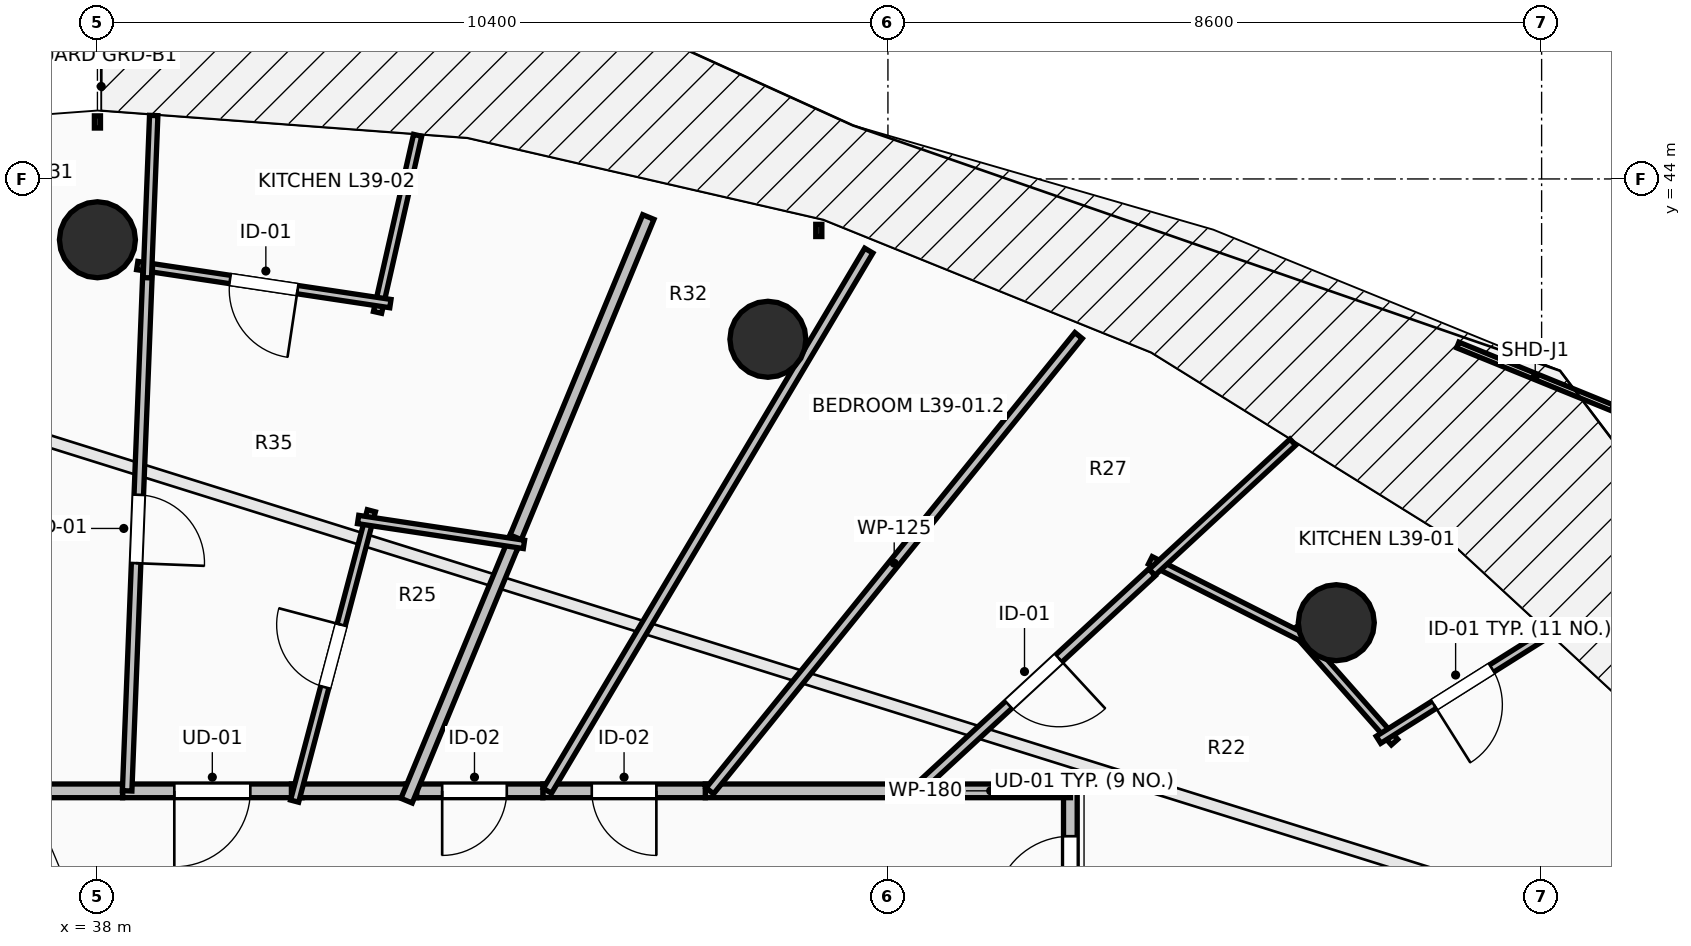
"""IFC4 building model, lengths in metres.
Left out: names, types, materials, properties, quantities, classifications, styles, units other than length and angle.
Written with IfcOpenShell. Run it as: python <this file> out.ifc"""

import sys

from ifc_helpers import new_model, si_unit, direction, frame, frame_2d, origin, origin_2d, place, context, subcontext, project, spatial, rectangle, circle, extrude, element, fill, save


model = new_model("IFC4")
c1 = context("Model", 3, precision=1e-05, world=origin(), true_north=direction((0.0, 1.0)))
c2 = subcontext(c1, "Body", "Model", "MODEL_VIEW")
j1 = project(units=[si_unit("LENGTHUNIT", "METRE"), si_unit("PLANEANGLEUNIT", "RADIAN")], contexts=[c1])
p1 = place(None, origin())
s1 = spatial("IfcSite", under=j1, at=p1, CompositionType="ELEMENT")
p2 = place(p1, origin())
s2 = spatial("IfcBuilding", under=s1, at=p2, CompositionType="ELEMENT")
p3 = place(p2, frame((0.0, 0.0, 146.6)))
s3 = spatial("IfcBuildingStorey", under=s2, at=p3, CompositionType="ELEMENT", Elevation=146.6)
for number, where, z_axis, x_axis in (
    (1, (54.299, 38.162, 0.0), (0.0, 0.0, 1.0), (0.707, 0.707, 0.0)),
    (2, (46.821, 41.891, 0.0), (0.0, 0.0, 1.0), (0.383, 0.924, 0.0)),
    (3, (38.0, 43.2, 0.0), (0.0, 0.0, 1.0), (0.0, 1.0, 0.0)),
):
    element("IfcColumn", number, at=place(p3, frame(where, z_axis=z_axis, x_axis=x_axis)), inside=s3, PredefinedType="COLUMN", context=c2, shape_type="SweptSolid", body=[
        extrude(circle(Radius=0.5, at=origin_2d()), origin(), (0.0, 0.0, 1.0), 3.5),
    ])
p4 = place(p3, frame((50.8, 33.756, 0.0), z_axis=(0.0, 0.0, 1.0), x_axis=(0.0, 1.0, 0.0)))
e4 = element("IfcWall", 4, at=p4, inside=s3, PredefinedType="PARTITIONING", context=c2, shape_type="SweptSolid", body=[
    extrude(rectangle(XDim=2.194, YDim=0.18, at=frame_2d((1.097, 0.0))), origin(), (0.0, 0.0, 1.0), 2.432),
])
p5 = place(p4, frame((0.597, 0.0, 0.0)))
e5 = element("IfcOpeningElement", 5, at=p5, cuts=e4, PredefinedType="OPENING", context=c2, shape_type="SweptSolid", body=[
    extrude(rectangle(XDim=1.0, YDim=2.15, at=frame_2d((0.5, 1.075))), frame((0.0, 0.105, 0.0), z_axis=(0.0, -1.0, 0.0), x_axis=(1.0, 0.0, 0.0)), (0.0, 0.0, 1.0), 0.21),
])
p6 = place(p3, frame((50.8, 35.95, 0.0), z_axis=(0.0, 0.0, 1.0), x_axis=(-1.0, 0.0, 0.0)))
e6 = element("IfcWall", 6, at=p6, inside=s3, PredefinedType="PARTITIONING", context=c2, shape_type="SweptSolid", body=[
    extrude(rectangle(XDim=2.096, YDim=0.18, at=frame_2d((1.048, 0.0))), origin(), (0.0, 0.0, 1.0), 2.972),
])
p7 = place(p3, frame((48.704, 35.95, 0.0), z_axis=(0.0, 0.0, 1.0), x_axis=(-1.0, 0.0, 0.0)))
e7 = element("IfcWall", 7, at=p7, inside=s3, PredefinedType="PARTITIONING", context=c2, shape_type="SweptSolid", body=[
    extrude(rectangle(XDim=2.707, YDim=0.18, at=frame_2d((1.354, 0.0))), origin(), (0.0, 0.0, 1.0), 2.432),
])
p8 = place(p3, frame((45.997, 35.95, 0.0), z_axis=(0.0, 0.0, 1.0), x_axis=(-1.0, 0.0, 0.0)))
e8 = element("IfcWall", 8, at=p8, inside=s3, PredefinedType="PARTITIONING", context=c2, shape_type="SweptSolid", body=[
    extrude(rectangle(XDim=2.137, YDim=0.18, at=frame_2d((1.068, 0.0))), origin(), (0.0, 0.0, 1.0), 2.972),
])
p9 = place(p8, frame((0.644, 0.0, 0.0)))
e9 = element("IfcOpeningElement", 9, at=p9, cuts=e8, PredefinedType="OPENING", context=c2, shape_type="SweptSolid", body=[
    extrude(rectangle(XDim=0.85, YDim=2.1, at=frame_2d((0.425, 1.05))), frame((0.0, 0.105, 0.0), z_axis=(0.0, -1.0, 0.0), x_axis=(1.0, 0.0, 0.0)), (0.0, 0.0, 1.0), 0.21),
])
p10 = place(p3, frame((43.86, 35.95, 0.0), z_axis=(0.0, 0.0, 1.0), x_axis=(-1.0, 0.0, 0.0)))
e10 = element("IfcWall", 10, at=p10, inside=s3, PredefinedType="PARTITIONING", context=c2, shape_type="SweptSolid", body=[
    extrude(rectangle(XDim=1.799, YDim=0.18, at=frame_2d((0.899, 0.0))), origin(), (0.0, 0.0, 1.0), 3.24),
])
p11 = place(p10, frame((0.475, 0.0, 0.0)))
e11 = element("IfcOpeningElement", 11, at=p11, cuts=e10, PredefinedType="OPENING", context=c2, shape_type="SweptSolid", body=[
    extrude(rectangle(XDim=0.85, YDim=2.1, at=frame_2d((0.425, 1.05))), frame((0.0, 0.105, 0.0), z_axis=(0.0, -1.0, 0.0), x_axis=(1.0, 0.0, 0.0)), (0.0, 0.0, 1.0), 0.21),
])
p12 = place(p3, frame((40.692, 35.95, 0.0), z_axis=(0.0, 0.0, 1.0), x_axis=(-1.0, 0.0, 0.0)))
e12 = element("IfcWall", 12, at=p12, inside=s3, PredefinedType="PARTITIONING", context=c2, shape_type="SweptSolid", body=[
    extrude(rectangle(XDim=2.361, YDim=0.18, at=frame_2d((1.18, 0.0))), origin(), (0.0, 0.0, 1.0), 3.24),
])
p13 = place(p12, frame((0.68, 0.0, 0.0)))
e13 = element("IfcOpeningElement", 13, at=p13, cuts=e12, PredefinedType="OPENING", context=c2, shape_type="SweptSolid", body=[
    extrude(rectangle(XDim=1.0, YDim=2.15, at=frame_2d((0.5, 1.075))), frame((0.0, 0.105, 0.0), z_axis=(0.0, -1.0, 0.0), x_axis=(1.0, 0.0, 0.0)), (0.0, 0.0, 1.0), 0.21),
])
p14 = place(p3, frame((42.201, 35.95, 0.0), z_axis=(0.0, 0.0, 1.0), x_axis=(-1.0, 0.0, 0.0)))
e14 = element("IfcWall", 14, at=p14, inside=s3, PredefinedType="PARTITIONING", context=c2, shape_type="SweptSolid", body=[
    extrude(rectangle(XDim=1.649, YDim=0.18, at=frame_2d((0.824, 0.0))), origin(), (0.0, 0.0, 1.0), 3.24),
])
p15 = place(p3, frame((38.331, 35.95, 0.0), z_axis=(0.0, 0.0, 1.0), x_axis=(-1.0, 0.0, 0.0)))
e15 = element("IfcWall", 15, at=p15, inside=s3, PredefinedType="PARTITIONING", context=c2, shape_type="SweptSolid", body=[
    extrude(rectangle(XDim=1.437, YDim=0.18, at=frame_2d((0.719, 0.0))), origin(), (0.0, 0.0, 1.0), 3.24),
])
p16 = place(p3, frame((55.065, 36.591, 0.0), z_axis=(0.0, 0.0, 1.0), x_axis=(-0.66216897397, 0.749354555542, 0.0)))
e16 = element("IfcWall", 16, at=p16, inside=s3, PredefinedType="PARTITIONING", context=c2, shape_type="SweptSolid", body=[
    extrude(rectangle(XDim=1.991, YDim=0.11, at=frame_2d((0.996, 0.0))), origin(), (0.0, 0.0, 1.0), 2.432),
])
p17 = place(p3, frame((53.964, 37.915, 0.0), z_axis=(0.0, 0.0, 1.0), x_axis=(-0.89250004606, 0.451047301049, 0.0)))
e17 = element("IfcWall", 17, at=p17, inside=s3, PredefinedType="PARTITIONING", context=c2, shape_type="SweptSolid", body=[
    extrude(rectangle(XDim=2.366, YDim=0.11, at=frame_2d((1.183, 0.0))), origin(), (0.0, 0.0, 1.0), 2.432),
])
p18 = place(p3, frame((51.874, 38.824, 0.0), z_axis=(0.0, 0.0, 1.0), x_axis=(0.734191073284, 0.678942904749, 0.0)))
e18 = element("IfcWall", 18, at=p18, inside=s3, PredefinedType="PARTITIONING", context=c2, shape_type="SweptSolid", body=[
    extrude(rectangle(XDim=2.523, YDim=0.11, at=frame_2d((1.262, 0.0))), origin(), (0.0, 0.0, 1.0), 2.728),
])
p19 = place(p3, frame((57.075, 38.021, 0.0), z_axis=(0.0, 0.0, 1.0), x_axis=(-0.846034075758, -0.533128823697, 0.0)))
e19 = element("IfcWall", 19, at=p19, inside=s3, PredefinedType="PARTITIONING", context=c2, shape_type="SweptSolid", body=[
    extrude(rectangle(XDim=2.626, YDim=0.11, at=frame_2d((1.313, 0.0))), origin(), (0.0, 0.0, 1.0), 2.728),
])
p20 = place(p19, frame((0.863, 0.0, 0.0)))
e20 = element("IfcOpeningElement", 20, at=p20, cuts=e19, PredefinedType="OPENING", context=c2, shape_type="SweptSolid", body=[
    extrude(rectangle(XDim=0.9, YDim=2.1, at=frame_2d((0.45, 1.05))), frame((0.0, 0.07, 0.0), z_axis=(0.0, -1.0, 0.0), x_axis=(1.0, 0.0, 0.0)), (0.0, 0.0, 1.0), 0.14),
])
p21 = place(p3, frame((51.874, 38.824, 0.0), z_axis=(0.0, 0.0, 1.0), x_axis=(-0.734347971597, -0.678773199685, 0.0)))
e21 = element("IfcWall", 21, at=p21, inside=s3, PredefinedType="PARTITIONING", context=c2, shape_type="SweptSolid", body=[
    extrude(rectangle(XDim=4.235, YDim=0.125, at=frame_2d((2.117, 0.0))), origin(), (0.0, 0.0, 1.0), 2.922),
])
p22 = place(p21, frame((1.667, 0.0, 0.0)))
e22 = element("IfcOpeningElement", 22, at=p22, cuts=e21, PredefinedType="OPENING", context=c2, shape_type="SweptSolid", body=[
    extrude(rectangle(XDim=0.9, YDim=2.1, at=frame_2d((0.45, 1.05))), frame((0.0, 0.077, 0.0), z_axis=(0.0, -1.0, 0.0), x_axis=(1.0, 0.0, 0.0)), (0.0, 0.0, 1.0), 0.155),
])
p23 = place(p3, frame((54.156, 32.692, 0.0), z_axis=(0.0, 0.0, 1.0), x_axis=(0.923849528339, 0.382755860814, 0.0)))
e23 = element("IfcWall", 23, at=p23, inside=s3, PredefinedType="PARTITIONING", context=c2, shape_type="SweptSolid", body=[
    extrude(rectangle(XDim=5.941, YDim=0.16, at=frame_2d((2.97, 0.0))), origin(), (0.0, 0.0, 1.0), 2.432),
])
p24 = place(p3, frame((50.908, 41.94, 0.0), z_axis=(0.0, 0.0, 1.0), x_axis=(-0.62935766896, -0.77711577292, 0.0)))
e24 = element("IfcWall", 24, at=p24, inside=s3, PredefinedType="PARTITIONING", context=c2, shape_type="SweptSolid", body=[
    extrude(rectangle(XDim=7.708, YDim=0.125, at=frame_2d((3.854, 0.0))), origin(), (0.0, 0.0, 1.0), 2.432),
])
p25 = place(p3, frame((48.148, 43.057, 0.0), z_axis=(0.0, 0.0, 1.0), x_axis=(-0.511279346901, -0.859414585304, 0.0)))
e25 = element("IfcWall", 25, at=p25, inside=s3, PredefinedType="PARTITIONING", context=c2, shape_type="SweptSolid", body=[
    extrude(rectangle(XDim=8.27, YDim=0.125, at=frame_2d((4.135, 0.0))), origin(), (0.0, 0.0, 1.0), 2.432),
])
p26 = place(p3, frame((45.248, 43.499, 0.0), z_axis=(0.0, 0.0, 1.0), x_axis=(-0.382708032219, -0.923869342535, 0.0)))
e26 = element("IfcWall", 26, at=p26, inside=s3, PredefinedType="PARTITIONING", context=c2, shape_type="SweptSolid", body=[
    extrude(rectangle(XDim=4.701, YDim=0.16, at=frame_2d((2.351, 0.0))), origin(), (0.0, 0.0, 1.0), 2.728),
])
p27 = place(p3, frame((43.503, 39.285, 0.0), z_axis=(0.0, 0.0, 1.0), x_axis=(-0.382733183699, -0.923858923265, 0.0)))
e27 = element("IfcWall", 27, at=p27, inside=s3, PredefinedType="PARTITIONING", context=c2, shape_type="SweptSolid", body=[
    extrude(rectangle(XDim=3.75, YDim=0.16, at=frame_2d((1.875, 0.0))), origin(), (0.0, 0.0, 1.0), 2.922),
])
p28 = place(p3, frame((40.594, 35.815, 0.0), z_axis=(0.0, 0.0, 1.0), x_axis=(0.255512094359, 0.966805859331, 0.0)))
e28 = element("IfcWall", 28, at=p28, inside=s3, PredefinedType="PARTITIONING", context=c2, shape_type="SweptSolid", body=[
    extrude(rectangle(XDim=3.951, YDim=0.11, at=frame_2d((1.976, 0.0))), origin(), (0.0, 0.0, 1.0), 2.922),
])
p29 = place(p28, frame((1.551, 0.0, 0.0)))
e29 = element("IfcOpeningElement", 29, at=p29, cuts=e28, PredefinedType="OPENING", context=c2, shape_type="SweptSolid", body=[
    extrude(rectangle(XDim=0.85, YDim=2.1, at=frame_2d((0.425, 1.05))), frame((0.0, 0.07, 0.0), z_axis=(0.0, -1.0, 0.0), x_axis=(1.0, 0.0, 0.0)), (0.0, 0.0, 1.0), 0.14),
])
p30 = place(p3, frame((41.43, 39.52, 0.0), z_axis=(0.0, 0.0, 1.0), x_axis=(0.98891036234, -0.148513619769, 0.0)))
e30 = element("IfcWall", 30, at=p30, inside=s3, PredefinedType="PARTITIONING", context=c2, shape_type="SweptSolid", body=[
    extrude(rectangle(XDim=2.206, YDim=0.11, at=frame_2d((1.103, 0.0))), origin(), (0.0, 0.0, 1.0), 2.922),
])
p31 = place(p3, frame((42.213, 44.574, 0.0), z_axis=(0.0, 0.0, 1.0), x_axis=(-0.220932027223, -0.975289208054, 0.0)))
e31 = element("IfcWall", 31, at=p31, inside=s3, PredefinedType="PARTITIONING", context=c2, shape_type="SweptSolid", body=[
    extrude(rectangle(XDim=2.389, YDim=0.11, at=frame_2d((1.195, 0.0))), origin(), (0.0, 0.0, 1.0), 2.728),
])
p32 = place(p3, frame((41.854, 42.36, 0.0), z_axis=(0.0, 0.0, 1.0), x_axis=(-0.988887919082, 0.148662986296, 0.0)))
e32 = element("IfcWall", 32, at=p32, inside=s3, PredefinedType="PARTITIONING", context=c2, shape_type="SweptSolid", body=[
    extrude(rectangle(XDim=3.368, YDim=0.11, at=frame_2d((1.684, 0.0))), origin(), (0.0, 0.0, 1.0), 3.24),
])
p33 = place(p32, frame((1.234, 0.0, 0.0)))
e33 = element("IfcOpeningElement", 33, at=p33, cuts=e32, PredefinedType="OPENING", context=c2, shape_type="SweptSolid", body=[
    extrude(rectangle(XDim=0.9, YDim=2.1, at=frame_2d((0.45, 1.05))), frame((0.0, 0.07, 0.0), z_axis=(0.0, -1.0, 0.0), x_axis=(1.0, 0.0, 0.0)), (0.0, 0.0, 1.0), 0.14),
])
p34 = place(p3, frame((38.662, 42.84, 0.0), z_axis=(0.0, 0.0, 1.0), x_axis=(-0.039300632457, -0.999227431713, 0.0)))
e34 = element("IfcWall", 34, at=p34, inside=s3, PredefinedType="PARTITIONING", context=c2, shape_type="SweptSolid", body=[
    extrude(rectangle(XDim=6.896, YDim=0.125, at=frame_2d((3.448, 0.0))), origin(), (0.0, 0.0, 1.0), 2.922),
])
p35 = place(p34, frame((2.998, 0.0, 0.0)))
e35 = element("IfcOpeningElement", 35, at=p35, cuts=e34, PredefinedType="OPENING", context=c2, shape_type="SweptSolid", body=[
    extrude(rectangle(XDim=0.9, YDim=2.1, at=frame_2d((0.45, 1.05))), frame((0.0, 0.077, 0.0), z_axis=(0.0, -1.0, 0.0), x_axis=(1.0, 0.0, 0.0)), (0.0, 0.0, 1.0), 0.155),
])
p36 = place(p3, frame((38.74, 44.835, 0.0), z_axis=(0.0, 0.0, 1.0), x_axis=(-0.039310852952, -0.999227029679, 0.0)))
e36 = element("IfcWall", 36, at=p36, inside=s3, PredefinedType="PARTITIONING", context=c2, shape_type="SweptSolid", body=[
    extrude(rectangle(XDim=2.136, YDim=0.11, at=frame_2d((1.068, 0.0))), origin(), (0.0, 0.0, 1.0), 2.728),
])
p37 = place(p5, origin())
e37 = element("IfcDoor", 37, at=p37, inside=s3, OperationType="SINGLE_SWING_LEFT", PredefinedType="DOOR", context=c2, shape_type="SweptSolid", body=[
    extrude(rectangle(XDim=1.0, YDim=2.15, at=frame_2d((0.5, 1.075))), frame((0.0, 0.025, 0.0), z_axis=(0.0, -1.0, 0.0), x_axis=(1.0, 0.0, 0.0)), (0.0, 0.0, 1.0), 0.05),
])
fill(e5, e37)
p38 = place(p13, origin())
e38 = element("IfcDoor", 38, at=p38, inside=s3, OperationType="SINGLE_SWING_RIGHT", PredefinedType="DOOR", context=c2, shape_type="SweptSolid", body=[
    extrude(rectangle(XDim=1.0, YDim=2.15, at=frame_2d((0.5, 1.075))), frame((0.0, 0.025, 0.0), z_axis=(0.0, -1.0, 0.0), x_axis=(1.0, 0.0, 0.0)), (0.0, 0.0, 1.0), 0.05),
])
fill(e13, e38)
p39 = place(p20, origin())
e39 = element("IfcDoor", 39, at=p39, inside=s3, OperationType="SINGLE_SWING_RIGHT", PredefinedType="DOOR", context=c2, shape_type="SweptSolid", body=[
    extrude(rectangle(XDim=0.9, YDim=2.1, at=frame_2d((0.45, 1.05))), frame((0.0, 0.025, 0.0), z_axis=(0.0, -1.0, 0.0), x_axis=(1.0, 0.0, 0.0)), (0.0, 0.0, 1.0), 0.05),
])
fill(e20, e39)
p40 = place(p22, origin())
e40 = element("IfcDoor", 40, at=p40, inside=s3, OperationType="SINGLE_SWING_LEFT", PredefinedType="DOOR", context=c2, shape_type="SweptSolid", body=[
    extrude(rectangle(XDim=0.9, YDim=2.1, at=frame_2d((0.45, 1.05))), frame((0.0, 0.025, 0.0), z_axis=(0.0, -1.0, 0.0), x_axis=(1.0, 0.0, 0.0)), (0.0, 0.0, 1.0), 0.05),
])
fill(e22, e40)
p41 = place(p29, origin())
e41 = element("IfcDoor", 41, at=p41, inside=s3, OperationType="SINGLE_SWING_RIGHT", PredefinedType="DOOR", context=c2, shape_type="SweptSolid", body=[
    extrude(rectangle(XDim=0.85, YDim=2.1, at=frame_2d((0.425, 1.05))), frame((0.0, 0.025, 0.0), z_axis=(0.0, -1.0, 0.0), x_axis=(1.0, 0.0, 0.0)), (0.0, 0.0, 1.0), 0.05),
])
fill(e29, e41)
p42 = place(p33, origin())
e42 = element("IfcDoor", 42, at=p42, inside=s3, OperationType="SINGLE_SWING_LEFT", PredefinedType="DOOR", context=c2, shape_type="SweptSolid", body=[
    extrude(rectangle(XDim=0.9, YDim=2.1, at=frame_2d((0.45, 1.05))), frame((0.0, 0.025, 0.0), z_axis=(0.0, -1.0, 0.0), x_axis=(1.0, 0.0, 0.0)), (0.0, 0.0, 1.0), 0.05),
])
fill(e33, e42)
p43 = place(p35, origin())
e43 = element("IfcDoor", 43, at=p43, inside=s3, OperationType="SINGLE_SWING_RIGHT", PredefinedType="DOOR", context=c2, shape_type="SweptSolid", body=[
    extrude(rectangle(XDim=0.9, YDim=2.1, at=frame_2d((0.45, 1.05))), frame((0.0, 0.025, 0.0), z_axis=(0.0, -1.0, 0.0), x_axis=(1.0, 0.0, 0.0)), (0.0, 0.0, 1.0), 0.05),
])
fill(e35, e43)
p44 = place(p9, origin())
e44 = element("IfcDoor", 44, at=p44, inside=s3, OperationType="SINGLE_SWING_LEFT", PredefinedType="DOOR", context=c2, shape_type="SweptSolid", body=[
    extrude(rectangle(XDim=0.85, YDim=2.1, at=frame_2d((0.425, 1.05))), frame((0.0, 0.025, 0.0), z_axis=(0.0, -1.0, 0.0), x_axis=(1.0, 0.0, 0.0)), (0.0, 0.0, 1.0), 0.05),
])
fill(e9, e44)
p45 = place(p11, origin())
e45 = element("IfcDoor", 45, at=p45, inside=s3, OperationType="SINGLE_SWING_RIGHT", PredefinedType="DOOR", context=c2, shape_type="SweptSolid", body=[
    extrude(rectangle(XDim=0.85, YDim=2.1, at=frame_2d((0.425, 1.05))), frame((0.0, 0.025, 0.0), z_axis=(0.0, -1.0, 0.0), x_axis=(1.0, 0.0, 0.0)), (0.0, 0.0, 1.0), 0.05),
])
fill(e11, e45)
save(model, sys.argv[1])
